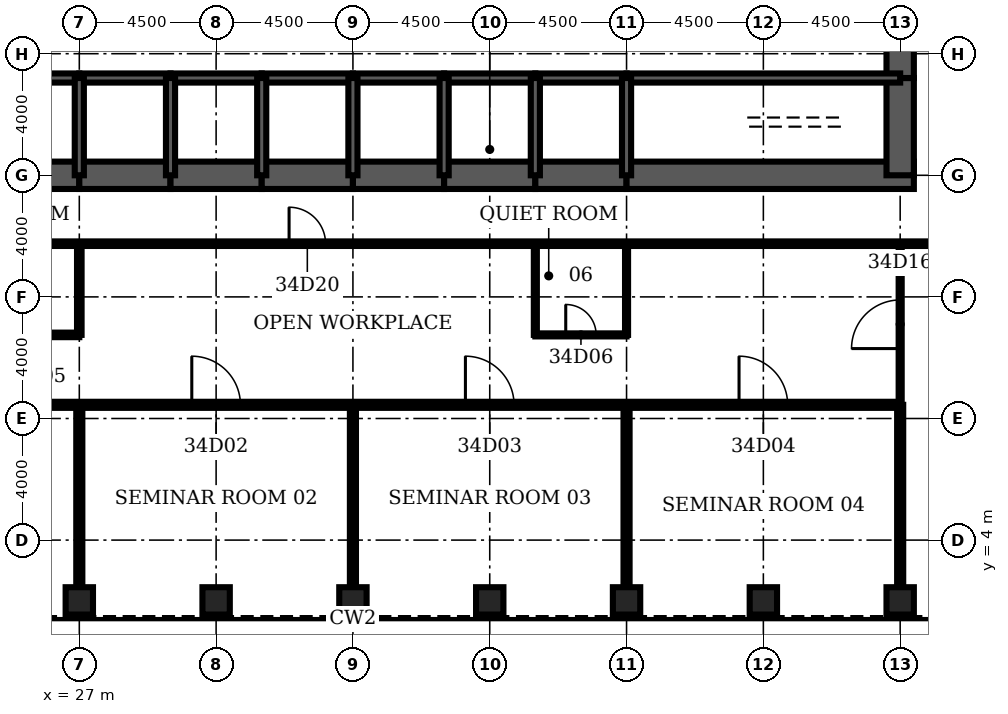
"""IFC4 building model, lengths in metres.
Left out: names, types, materials, properties, quantities, classifications, styles, units other than length and angle.
Written with IfcOpenShell. Run it as: python <this file> out.ifc"""

import sys

from ifc_helpers import new_model, si_unit, direction, frame, frame_2d, origin, origin_2d, place, context, subcontext, project, spatial, rectangle, hollow_rectangle, extrude, element, fill, save


model = new_model("IFC4")
c1 = context("Model", 3, precision=1e-05, world=origin(), true_north=direction((0.0, 1.0)))
c2 = subcontext(c1, "Body", "Model", "MODEL_VIEW")
j1 = project(units=[si_unit("LENGTHUNIT", "METRE"), si_unit("PLANEANGLEUNIT", "RADIAN")], contexts=[c1])
p1 = place(None, origin())
s1 = spatial("IfcSite", under=j1, at=p1, CompositionType="ELEMENT")
p2 = place(p1, origin())
s2 = spatial("IfcBuilding", under=s1, at=p2, CompositionType="ELEMENT")
p3 = place(p2, frame((0.0, 0.0, 155.1)))
s3 = spatial("IfcBuildingStorey", under=s2, at=p3, CompositionType="ELEMENT", Elevation=155.1)
for number, where, z_axis, x_axis in (
    (1, (27.0, 2.0, 0.0), (0.0, 0.0, 1.0), (0.0, 1.0, 0.0)),
    (2, (31.5, 2.0, 0.0), (0.0, 0.0, 1.0), (0.0, 1.0, 0.0)),
    (3, (36.0, 2.0, 0.0), (0.0, 0.0, 1.0), (0.0, 1.0, 0.0)),
    (4, (40.5, 2.0, 0.0), (0.0, 0.0, 1.0), (0.0, 1.0, 0.0)),
    (5, (45.0, 2.0, 0.0), (0.0, 0.0, 1.0), (0.0, 1.0, 0.0)),
    (6, (49.5, 2.0, 0.0), (0.0, 0.0, 1.0), (0.0, 1.0, 0.0)),
    (7, (54.0, 2.0, 0.0), (0.0, 0.0, 1.0), (0.0, 1.0, 0.0)),
):
    element("IfcColumn", number, at=place(p3, frame(where, z_axis=z_axis, x_axis=x_axis)), inside=s3, PredefinedType="COLUMN", context=c2, shape_type="SweptSolid", body=[
        extrude(hollow_rectangle(XDim=0.9, YDim=0.9, WallThickness=0.1, at=origin_2d()), origin(), (0.0, 0.0, 1.0), 4.2),
    ])
p4 = place(p3, frame((17.55, 16.0, 0.0), z_axis=(0.0, 0.0, 1.0), x_axis=(1.0, 0.0, 0.0)))
e8 = element("IfcWall", 8, at=p4, inside=s3, PredefinedType="SHEAR", context=c2, shape_type="SweptSolid", body=[
    extrude(rectangle(XDim=9.45, YDim=0.9, at=frame_2d((4.725, 0.0))), origin(), (0.0, 0.0, 1.0), 4.2),
])
for number, where, z_axis, x_axis in (
    (9, (27.0, 16.0, 0.0), (0.0, 0.0, 1.0), (1.0, 0.0, 0.0)),
    (10, (30.0, 16.0, 0.0), (0.0, 0.0, 1.0), (1.0, 0.0, 0.0)),
    (11, (33.0, 16.0, 0.0), (0.0, 0.0, 1.0), (1.0, 0.0, 0.0)),
    (12, (36.0, 16.0, 0.0), (0.0, 0.0, 1.0), (1.0, 0.0, 0.0)),
    (13, (39.0, 16.0, 0.0), (0.0, 0.0, 1.0), (1.0, 0.0, 0.0)),
    (14, (42.0, 16.0, 0.0), (0.0, 0.0, 1.0), (1.0, 0.0, 0.0)),
):
    element("IfcWall", number, at=place(p3, frame(where, z_axis=z_axis, x_axis=x_axis)), inside=s3, PredefinedType="SHEAR", context=c2, shape_type="SweptSolid", body=[
        extrude(rectangle(XDim=3.0, YDim=0.9, at=frame_2d((1.5, 0.0))), origin(), (0.0, 0.0, 1.0), 4.2),
    ])
p5 = place(p3, frame((45.0, 16.0, 0.0), z_axis=(0.0, 0.0, 1.0), x_axis=(1.0, 0.0, 0.0)))
e15 = element("IfcWall", 15, at=p5, inside=s3, PredefinedType="SHEAR", context=c2, shape_type="SweptSolid", body=[
    extrude(rectangle(XDim=9.45, YDim=0.9, at=frame_2d((4.725, 0.0))), origin(), (0.0, 0.0, 1.0), 4.2),
])
p6 = place(p3, frame((54.0, 16.0, 0.0), z_axis=(0.0, 0.0, 1.0), x_axis=(0.0, 1.0, 0.0)))
e16 = element("IfcWall", 16, at=p6, inside=s3, PredefinedType="SHEAR", context=c2, shape_type="SweptSolid", body=[
    extrude(rectangle(XDim=3.2, YDim=0.9, at=frame_2d((1.6, 0.0))), origin(), (0.0, 0.0, 1.0), 4.2),
])
p7 = place(p3, frame((54.0, 19.2, 0.0), z_axis=(0.0, 0.0, 1.0), x_axis=(0.0, 1.0, 0.0)))
e17 = element("IfcWall", 17, at=p7, inside=s3, PredefinedType="SHEAR", context=c2, shape_type="SweptSolid", body=[
    extrude(rectangle(XDim=2.8, YDim=0.9, at=frame_2d((1.4, 0.0))), origin(), (0.0, 0.0, 1.0), 4.2),
])
p8 = place(p7, frame((0.4, 0.0, 0.0)))
e18 = element("IfcOpeningElement", 18, at=p8, cuts=e17, PredefinedType="OPENING", context=c2, shape_type="SweptSolid", body=[
    extrude(rectangle(XDim=1.8, YDim=2.1, at=frame_2d((0.9, 1.05))), frame((0.0, 0.46, 0.0), z_axis=(0.0, -1.0, 0.0), x_axis=(1.0, 0.0, 0.0)), (0.0, 0.0, 1.0), 0.92),
])
p9 = place(p3, frame((18.0, 19.2, 0.0), z_axis=(0.0, 0.0, 1.0), x_axis=(1.0, 0.0, 0.0)))
e19 = element("IfcWall", 19, at=p9, inside=s3, PredefinedType="SOLIDWALL", context=c2, shape_type="SweptSolid", body=[
    extrude(rectangle(XDim=9.0, YDim=0.3, at=frame_2d((4.5, 0.0))), origin(), (0.0, 0.0, 1.0), 4.2),
])
p10 = place(p9, frame((0.65, 0.0, 0.0)))
e20 = element("IfcOpeningElement", 20, at=p10, cuts=e19, PredefinedType="OPENING", context=c2, shape_type="SweptSolid", body=[
    extrude(rectangle(XDim=1.0, YDim=2.1, at=frame_2d((0.5, 1.05))), frame((0.0, 0.16, 0.0), z_axis=(0.0, -1.0, 0.0), x_axis=(1.0, 0.0, 0.0)), (0.0, 0.0, 1.0), 0.32),
])
p11 = place(p3, frame((27.0, 19.2, 0.0), z_axis=(0.0, 0.0, 1.0), x_axis=(1.0, 0.0, 0.0)))
e21 = element("IfcWall", 21, at=p11, inside=s3, PredefinedType="SOLIDWALL", context=c2, shape_type="SweptSolid", body=[
    extrude(rectangle(XDim=3.0, YDim=0.3, at=frame_2d((1.5, 0.0))), origin(), (0.0, 0.0, 1.0), 4.2),
])
p12 = place(p11, frame((0.95, 0.0, 0.0)))
e22 = element("IfcOpeningElement", 22, at=p12, cuts=e21, PredefinedType="OPENING", context=c2, shape_type="SweptSolid", body=[
    extrude(rectangle(XDim=1.1, YDim=2.2, at=frame_2d((0.55, 1.1))), frame((0.0, 0.16, 0.0), z_axis=(0.0, -1.0, 0.0), x_axis=(1.0, 0.0, 0.0)), (0.0, 0.0, 1.0), 0.32),
])
p13 = place(p3, frame((30.0, 19.2, 0.0), z_axis=(0.0, 0.0, 1.0), x_axis=(1.0, 0.0, 0.0)))
e23 = element("IfcWall", 23, at=p13, inside=s3, PredefinedType="SOLIDWALL", context=c2, shape_type="SweptSolid", body=[
    extrude(rectangle(XDim=3.0, YDim=0.3, at=frame_2d((1.5, 0.0))), origin(), (0.0, 0.0, 1.0), 4.2),
])
p14 = place(p13, frame((0.95, 0.0, 0.0)))
e24 = element("IfcOpeningElement", 24, at=p14, cuts=e23, PredefinedType="OPENING", context=c2, shape_type="SweptSolid", body=[
    extrude(rectangle(XDim=1.1, YDim=2.2, at=frame_2d((0.55, 1.1))), frame((0.0, 0.16, 0.0), z_axis=(0.0, -1.0, 0.0), x_axis=(1.0, 0.0, 0.0)), (0.0, 0.0, 1.0), 0.32),
])
p15 = place(p3, frame((33.0, 19.2, 0.0), z_axis=(0.0, 0.0, 1.0), x_axis=(1.0, 0.0, 0.0)))
e25 = element("IfcWall", 25, at=p15, inside=s3, PredefinedType="SOLIDWALL", context=c2, shape_type="SweptSolid", body=[
    extrude(rectangle(XDim=3.0, YDim=0.3, at=frame_2d((1.5, 0.0))), origin(), (0.0, 0.0, 1.0), 4.2),
])
p16 = place(p15, frame((0.95, 0.0, 0.0)))
e26 = element("IfcOpeningElement", 26, at=p16, cuts=e25, PredefinedType="OPENING", context=c2, shape_type="SweptSolid", body=[
    extrude(rectangle(XDim=1.1, YDim=2.2, at=frame_2d((0.55, 1.1))), frame((0.0, 0.16, 0.0), z_axis=(0.0, -1.0, 0.0), x_axis=(1.0, 0.0, 0.0)), (0.0, 0.0, 1.0), 0.32),
])
p17 = place(p3, frame((36.0, 19.2, 0.0), z_axis=(0.0, 0.0, 1.0), x_axis=(1.0, 0.0, 0.0)))
e27 = element("IfcWall", 27, at=p17, inside=s3, PredefinedType="SOLIDWALL", context=c2, shape_type="SweptSolid", body=[
    extrude(rectangle(XDim=3.0, YDim=0.3, at=frame_2d((1.5, 0.0))), origin(), (0.0, 0.0, 1.0), 4.2),
])
p18 = place(p17, frame((0.95, 0.0, 0.0)))
e28 = element("IfcOpeningElement", 28, at=p18, cuts=e27, PredefinedType="OPENING", context=c2, shape_type="SweptSolid", body=[
    extrude(rectangle(XDim=1.1, YDim=2.2, at=frame_2d((0.55, 1.1))), frame((0.0, 0.16, 0.0), z_axis=(0.0, -1.0, 0.0), x_axis=(1.0, 0.0, 0.0)), (0.0, 0.0, 1.0), 0.32),
])
p19 = place(p3, frame((39.0, 19.2, 0.0), z_axis=(0.0, 0.0, 1.0), x_axis=(1.0, 0.0, 0.0)))
e29 = element("IfcWall", 29, at=p19, inside=s3, PredefinedType="SOLIDWALL", context=c2, shape_type="SweptSolid", body=[
    extrude(rectangle(XDim=3.0, YDim=0.3, at=frame_2d((1.5, 0.0))), origin(), (0.0, 0.0, 1.0), 4.2),
])
p20 = place(p19, frame((1.0, 0.0, 0.0)))
e30 = element("IfcOpeningElement", 30, at=p20, cuts=e29, PredefinedType="OPENING", context=c2, shape_type="SweptSolid", body=[
    extrude(rectangle(XDim=1.0, YDim=2.1, at=frame_2d((0.5, 1.05))), frame((0.0, 0.16, 0.0), z_axis=(0.0, -1.0, 0.0), x_axis=(1.0, 0.0, 0.0)), (0.0, 0.0, 1.0), 0.32),
])
p21 = place(p3, frame((42.0, 19.2, 0.0), z_axis=(0.0, 0.0, 1.0), x_axis=(1.0, 0.0, 0.0)))
e31 = element("IfcWall", 31, at=p21, inside=s3, PredefinedType="SOLIDWALL", context=c2, shape_type="SweptSolid", body=[
    extrude(rectangle(XDim=3.0, YDim=0.3, at=frame_2d((1.5, 0.0))), origin(), (0.0, 0.0, 1.0), 4.2),
])
p22 = place(p3, frame((45.0, 19.2, 0.0), z_axis=(0.0, 0.0, 1.0), x_axis=(1.0, 0.0, 0.0)))
e32 = element("IfcWall", 32, at=p22, inside=s3, PredefinedType="SOLIDWALL", context=c2, shape_type="SweptSolid", body=[
    extrude(rectangle(XDim=9.0, YDim=0.3, at=frame_2d((4.5, 0.0))), origin(), (0.0, 0.0, 1.0), 4.2),
])
p23 = place(p22, frame((7.35, 0.0, 0.0)))
e33 = element("IfcOpeningElement", 33, at=p23, cuts=e32, PredefinedType="OPENING", context=c2, shape_type="SweptSolid", body=[
    extrude(rectangle(XDim=1.0, YDim=2.1, at=frame_2d((0.5, 1.05))), frame((0.0, 0.16, 0.0), z_axis=(0.0, -1.0, 0.0), x_axis=(1.0, 0.0, 0.0)), (0.0, 0.0, 1.0), 0.32),
])
for number, where, z_axis, x_axis in (
    (34, (27.0, 16.0, 0.0), (0.0, 0.0, 1.0), (0.0, 1.0, 0.0)),
    (35, (30.0, 16.0, 0.0), (0.0, 0.0, 1.0), (0.0, 1.0, 0.0)),
    (36, (33.0, 16.0, 0.0), (0.0, 0.0, 1.0), (0.0, 1.0, 0.0)),
    (37, (36.0, 16.0, 0.0), (0.0, 0.0, 1.0), (0.0, 1.0, 0.0)),
    (38, (39.0, 16.0, 0.0), (0.0, 0.0, 1.0), (0.0, 1.0, 0.0)),
    (39, (42.0, 16.0, 0.0), (0.0, 0.0, 1.0), (0.0, 1.0, 0.0)),
    (40, (45.0, 16.0, 0.0), (0.0, 0.0, 1.0), (0.0, 1.0, 0.0)),
):
    element("IfcWall", number, at=place(p3, frame(where, z_axis=z_axis, x_axis=x_axis)), inside=s3, PredefinedType="SOLIDWALL", context=c2, shape_type="SweptSolid", body=[
        extrude(rectangle(XDim=3.2, YDim=0.3, at=frame_2d((1.6, 0.0))), origin(), (0.0, 0.0, 1.0), 4.2),
    ])
p24 = place(p3, frame((39.15, 17.4, 0.0), z_axis=(0.0, 0.0, 1.0), x_axis=(1.0, 0.0, 0.0)))
e41 = element("IfcWall", 41, at=p24, inside=s3, PredefinedType="SOLIDWALL", context=c2, shape_type="SweptSolid", body=[
    extrude(rectangle(XDim=2.7, YDim=0.3, at=frame_2d((1.35, 0.0))), origin(), (0.0, 0.0, 1.0), 4.04),
])
p25 = place(p24, frame((0.85, 0.0, 0.0)))
e42 = element("IfcOpeningElement", 42, at=p25, cuts=e41, PredefinedType="OPENING", context=c2, shape_type="SweptSolid", body=[
    extrude(rectangle(XDim=1.0, YDim=2.1, at=frame_2d((0.5, 1.05))), frame((0.0, 0.16, 0.0), z_axis=(0.0, -1.0, 0.0), x_axis=(1.0, 0.0, 0.0)), (0.0, 0.0, 1.0), 0.32),
])
p26 = place(p3, frame((18.0, 8.45, 0.0), z_axis=(0.0, 0.0, 1.0), x_axis=(1.0, 0.0, 0.0)))
e43 = element("IfcWall", 43, at=p26, inside=s3, PredefinedType="PARTITIONING", context=c2, shape_type="SweptSolid", body=[
    extrude(rectangle(XDim=36.0, YDim=0.2, at=frame_2d((18.0, 0.0))), origin(), (0.0, 0.0, 1.0), 3.0),
])
p27 = place(p26, frame((3.7, 0.0, 0.0)))
e44 = element("IfcOpeningElement", 44, at=p27, cuts=e43, PredefinedType="OPENING", context=c2, shape_type="SweptSolid", body=[
    extrude(rectangle(XDim=1.6, YDim=2.1, at=frame_2d((0.8, 1.05))), frame((0.0, 0.11, 0.0), z_axis=(0.0, -1.0, 0.0), x_axis=(1.0, 0.0, 0.0)), (0.0, 0.0, 1.0), 0.22),
])
p28 = place(p26, frame((12.7, 0.0, 0.0)))
e45 = element("IfcOpeningElement", 45, at=p28, cuts=e43, PredefinedType="OPENING", context=c2, shape_type="SweptSolid", body=[
    extrude(rectangle(XDim=1.6, YDim=2.1, at=frame_2d((0.8, 1.05))), frame((0.0, 0.11, 0.0), z_axis=(0.0, -1.0, 0.0), x_axis=(1.0, 0.0, 0.0)), (0.0, 0.0, 1.0), 0.22),
])
p29 = place(p26, frame((21.7, 0.0, 0.0)))
e46 = element("IfcOpeningElement", 46, at=p29, cuts=e43, PredefinedType="OPENING", context=c2, shape_type="SweptSolid", body=[
    extrude(rectangle(XDim=1.6, YDim=2.1, at=frame_2d((0.8, 1.05))), frame((0.0, 0.11, 0.0), z_axis=(0.0, -1.0, 0.0), x_axis=(1.0, 0.0, 0.0)), (0.0, 0.0, 1.0), 0.22),
])
p30 = place(p26, frame((30.7, 0.0, 0.0)))
e47 = element("IfcOpeningElement", 47, at=p30, cuts=e43, PredefinedType="OPENING", context=c2, shape_type="SweptSolid", body=[
    extrude(rectangle(XDim=1.6, YDim=2.1, at=frame_2d((0.8, 1.05))), frame((0.0, 0.11, 0.0), z_axis=(0.0, -1.0, 0.0), x_axis=(1.0, 0.0, 0.0)), (0.0, 0.0, 1.0), 0.22),
])
p31 = place(p3, frame((24.0, 10.75, 0.0), z_axis=(0.0, 0.0, 1.0), x_axis=(1.0, 0.0, 0.0)))
e48 = element("IfcWall", 48, at=p31, inside=s3, PredefinedType="PARTITIONING", context=c2, shape_type="SweptSolid", body=[
    extrude(rectangle(XDim=3.0, YDim=0.15, at=frame_2d((1.5, 0.0))), origin(), (0.0, 0.0, 1.0), 3.0),
])
p32 = place(p31, frame((1.0, 0.0, 0.0)))
e49 = element("IfcOpeningElement", 49, at=p32, cuts=e48, PredefinedType="OPENING", context=c2, shape_type="SweptSolid", body=[
    extrude(rectangle(XDim=1.0, YDim=2.1, at=frame_2d((0.5, 1.05))), frame((0.0, 0.085, 0.0), z_axis=(0.0, -1.0, 0.0), x_axis=(1.0, 0.0, 0.0)), (0.0, 0.0, 1.0), 0.17),
])
p33 = place(p3, frame((42.0, 10.75, 0.0), z_axis=(0.0, 0.0, 1.0), x_axis=(1.0, 0.0, 0.0)))
e50 = element("IfcWall", 50, at=p33, inside=s3, PredefinedType="PARTITIONING", context=c2, shape_type="SweptSolid", body=[
    extrude(rectangle(XDim=3.0, YDim=0.1, at=frame_2d((1.5, 0.0))), origin(), (0.0, 0.0, 1.0), 3.0),
])
p34 = place(p33, frame((1.0, 0.0, 0.0)))
e51 = element("IfcOpeningElement", 51, at=p34, cuts=e50, PredefinedType="OPENING", context=c2, shape_type="SweptSolid", body=[
    extrude(rectangle(XDim=1.0, YDim=2.1, at=frame_2d((0.5, 1.05))), frame((0.0, 0.06, 0.0), z_axis=(0.0, -1.0, 0.0), x_axis=(1.0, 0.0, 0.0)), (0.0, 0.0, 1.0), 0.12),
])
p35 = place(p3, frame((15.15, 13.75, 0.0), z_axis=(0.0, 0.0, 1.0), x_axis=(1.0, 0.0, 0.0)))
e52 = element("IfcWall", 52, at=p35, inside=s3, PredefinedType="PARTITIONING", context=c2, shape_type="SweptSolid", body=[
    extrude(rectangle(XDim=41.7, YDim=0.15, at=frame_2d((20.85, 0.0))), origin(), (0.0, 0.0, 1.0), 3.0),
])
p36 = place(p35, frame((18.75, 0.0, 0.0)))
e53 = element("IfcOpeningElement", 53, at=p36, cuts=e52, PredefinedType="OPENING", context=c2, shape_type="SweptSolid", body=[
    extrude(rectangle(XDim=1.2, YDim=2.1, at=frame_2d((0.6, 1.05))), frame((0.0, 0.085, 0.0), z_axis=(0.0, -1.0, 0.0), x_axis=(1.0, 0.0, 0.0)), (0.0, 0.0, 1.0), 0.17),
])
p37 = place(p3, frame((27.0, 2.45, 0.0), z_axis=(0.0, 0.0, 1.0), x_axis=(0.0, 1.0, 0.0)))
e54 = element("IfcWall", 54, at=p37, inside=s3, PredefinedType="PARTITIONING", context=c2, shape_type="SweptSolid", body=[
    extrude(rectangle(XDim=6.0, YDim=0.2, at=frame_2d((3.0, 0.0))), origin(), (0.0, 0.0, 1.0), 3.0),
])
p38 = place(p3, frame((27.0, 10.75, 0.0), z_axis=(0.0, 0.0, 1.0), x_axis=(0.0, 1.0, 0.0)))
e55 = element("IfcWall", 55, at=p38, inside=s3, PredefinedType="PARTITIONING", context=c2, shape_type="SweptSolid", body=[
    extrude(rectangle(XDim=3.0, YDim=0.15, at=frame_2d((1.5, 0.0))), origin(), (0.0, 0.0, 1.0), 3.0),
])
p39 = place(p3, frame((36.0, 2.45, 0.0), z_axis=(0.0, 0.0, 1.0), x_axis=(0.0, 1.0, 0.0)))
e56 = element("IfcWall", 56, at=p39, inside=s3, PredefinedType="PARTITIONING", context=c2, shape_type="SweptSolid", body=[
    extrude(rectangle(XDim=6.0, YDim=0.2, at=frame_2d((3.0, 0.0))), origin(), (0.0, 0.0, 1.0), 3.0),
])
p40 = place(p3, frame((42.0, 10.75, 0.0), z_axis=(0.0, 0.0, 1.0), x_axis=(0.0, 1.0, 0.0)))
e57 = element("IfcWall", 57, at=p40, inside=s3, PredefinedType="PARTITIONING", context=c2, shape_type="SweptSolid", body=[
    extrude(rectangle(XDim=3.0, YDim=0.1, at=frame_2d((1.5, 0.0))), origin(), (0.0, 0.0, 1.0), 3.0),
])
p41 = place(p3, frame((45.0, 2.45, 0.0), z_axis=(0.0, 0.0, 1.0), x_axis=(0.0, 1.0, 0.0)))
e58 = element("IfcWall", 58, at=p41, inside=s3, PredefinedType="PARTITIONING", context=c2, shape_type="SweptSolid", body=[
    extrude(rectangle(XDim=6.0, YDim=0.2, at=frame_2d((3.0, 0.0))), origin(), (0.0, 0.0, 1.0), 3.0),
])
p42 = place(p3, frame((45.0, 10.75, 0.0), z_axis=(0.0, 0.0, 1.0), x_axis=(0.0, 1.0, 0.0)))
e59 = element("IfcWall", 59, at=p42, inside=s3, PredefinedType="PARTITIONING", context=c2, shape_type="SweptSolid", body=[
    extrude(rectangle(XDim=3.0, YDim=0.1, at=frame_2d((1.5, 0.0))), origin(), (0.0, 0.0, 1.0), 3.0),
])
p43 = place(p3, frame((54.0, 2.45, 0.0), z_axis=(0.0, 0.0, 1.0), x_axis=(0.0, 1.0, 0.0)))
e60 = element("IfcWall", 60, at=p43, inside=s3, PredefinedType="PARTITIONING", context=c2, shape_type="SweptSolid", body=[
    extrude(rectangle(XDim=6.0, YDim=0.2, at=frame_2d((3.0, 0.0))), origin(), (0.0, 0.0, 1.0), 3.0),
])
p44 = place(p3, frame((54.0, 8.45, 0.0), z_axis=(0.0, 0.0, 1.0), x_axis=(0.0, 1.0, 0.0)))
e61 = element("IfcWall", 61, at=p44, inside=s3, PredefinedType="PARTITIONING", context=c2, shape_type="SweptSolid", body=[
    extrude(rectangle(XDim=5.3, YDim=0.1, at=frame_2d((2.65, 0.0))), origin(), (0.0, 0.0, 1.0), 3.0),
])
p45 = place(p44, frame((1.85, 0.0, 0.0)))
e62 = element("IfcOpeningElement", 62, at=p45, cuts=e61, PredefinedType="OPENING", context=c2, shape_type="SweptSolid", body=[
    extrude(rectangle(XDim=1.6, YDim=2.1, at=frame_2d((0.8, 1.05))), frame((0.0, 0.06, 0.0), z_axis=(0.0, -1.0, 0.0), x_axis=(1.0, 0.0, 0.0)), (0.0, 0.0, 1.0), 0.12),
])
p46 = place(p25, origin())
e63 = element("IfcDoor", 63, at=p46, inside=s3, OperationType="SINGLE_SWING_LEFT", PredefinedType="DOOR", context=c2, shape_type="SweptSolid", body=[
    extrude(rectangle(XDim=1.0, YDim=2.1, at=frame_2d((0.5, 1.05))), frame((0.0, 0.025, 0.0), z_axis=(0.0, -1.0, 0.0), x_axis=(1.0, 0.0, 0.0)), (0.0, 0.0, 1.0), 0.05),
])
fill(e42, e63)
p47 = place(p28, origin())
e64 = element("IfcDoor", 64, at=p47, inside=s3, OperationType="SINGLE_SWING_LEFT", PredefinedType="DOOR", context=c2, shape_type="SweptSolid", body=[
    extrude(rectangle(XDim=1.6, YDim=2.1, at=frame_2d((0.8, 1.05))), frame((0.0, 0.025, 0.0), z_axis=(0.0, -1.0, 0.0), x_axis=(1.0, 0.0, 0.0)), (0.0, 0.0, 1.0), 0.05),
])
fill(e45, e64)
p48 = place(p29, origin())
e65 = element("IfcDoor", 65, at=p48, inside=s3, OperationType="SINGLE_SWING_LEFT", PredefinedType="DOOR", context=c2, shape_type="SweptSolid", body=[
    extrude(rectangle(XDim=1.6, YDim=2.1, at=frame_2d((0.8, 1.05))), frame((0.0, 0.025, 0.0), z_axis=(0.0, -1.0, 0.0), x_axis=(1.0, 0.0, 0.0)), (0.0, 0.0, 1.0), 0.05),
])
fill(e46, e65)
p49 = place(p30, origin())
e66 = element("IfcDoor", 66, at=p49, inside=s3, OperationType="SINGLE_SWING_LEFT", PredefinedType="DOOR", context=c2, shape_type="SweptSolid", body=[
    extrude(rectangle(XDim=1.6, YDim=2.1, at=frame_2d((0.8, 1.05))), frame((0.0, 0.025, 0.0), z_axis=(0.0, -1.0, 0.0), x_axis=(1.0, 0.0, 0.0)), (0.0, 0.0, 1.0), 0.05),
])
fill(e47, e66)
p50 = place(p34, origin())
e67 = element("IfcDoor", 67, at=p50, inside=s3, OperationType="SINGLE_SWING_LEFT", PredefinedType="DOOR", context=c2, shape_type="SweptSolid", body=[
    extrude(rectangle(XDim=1.0, YDim=2.1, at=frame_2d((0.5, 1.05))), frame((0.0, 0.025, 0.0), z_axis=(0.0, -1.0, 0.0), x_axis=(1.0, 0.0, 0.0)), (0.0, 0.0, 1.0), 0.05),
])
fill(e51, e67)
p51 = place(p45, origin())
e68 = element("IfcDoor", 68, at=p51, inside=s3, OperationType="SINGLE_SWING_LEFT", PredefinedType="DOOR", context=c2, shape_type="SweptSolid", body=[
    extrude(rectangle(XDim=1.6, YDim=2.1, at=frame_2d((0.8, 1.05))), frame((0.0, 0.025, 0.0), z_axis=(0.0, -1.0, 0.0), x_axis=(1.0, 0.0, 0.0)), (0.0, 0.0, 1.0), 0.05),
])
fill(e62, e68)
p52 = place(p36, origin())
e69 = element("IfcDoor", 69, at=p52, inside=s3, OperationType="SINGLE_SWING_LEFT", PredefinedType="DOOR", context=c2, shape_type="SweptSolid", body=[
    extrude(rectangle(XDim=1.2, YDim=2.1, at=frame_2d((0.6, 1.05))), frame((0.0, 0.025, 0.0), z_axis=(0.0, -1.0, 0.0), x_axis=(1.0, 0.0, 0.0)), (0.0, 0.0, 1.0), 0.05),
])
fill(e53, e69)
p53 = place(p12, origin())
e70 = element("IfcDoor", 70, at=p53, inside=s3, OperationType="DOUBLE_DOOR_SLIDING", PredefinedType="USERDEFINED", context=c2, shape_type="SweptSolid", body=[
    extrude(rectangle(XDim=1.1, YDim=2.2, at=frame_2d((0.55, 1.1))), frame((0.0, 0.025, 0.0), z_axis=(0.0, -1.0, 0.0), x_axis=(1.0, 0.0, 0.0)), (0.0, 0.0, 1.0), 0.05),
])
fill(e22, e70)
p54 = place(p14, origin())
e71 = element("IfcDoor", 71, at=p54, inside=s3, OperationType="DOUBLE_DOOR_SLIDING", PredefinedType="USERDEFINED", context=c2, shape_type="SweptSolid", body=[
    extrude(rectangle(XDim=1.1, YDim=2.2, at=frame_2d((0.55, 1.1))), frame((0.0, 0.025, 0.0), z_axis=(0.0, -1.0, 0.0), x_axis=(1.0, 0.0, 0.0)), (0.0, 0.0, 1.0), 0.05),
])
fill(e24, e71)
p55 = place(p16, origin())
e72 = element("IfcDoor", 72, at=p55, inside=s3, OperationType="DOUBLE_DOOR_SLIDING", PredefinedType="USERDEFINED", context=c2, shape_type="SweptSolid", body=[
    extrude(rectangle(XDim=1.1, YDim=2.2, at=frame_2d((0.55, 1.1))), frame((0.0, 0.025, 0.0), z_axis=(0.0, -1.0, 0.0), x_axis=(1.0, 0.0, 0.0)), (0.0, 0.0, 1.0), 0.05),
])
fill(e26, e72)
p56 = place(p18, origin())
e73 = element("IfcDoor", 73, at=p56, inside=s3, OperationType="DOUBLE_DOOR_SLIDING", PredefinedType="USERDEFINED", context=c2, shape_type="SweptSolid", body=[
    extrude(rectangle(XDim=1.1, YDim=2.2, at=frame_2d((0.55, 1.1))), frame((0.0, 0.025, 0.0), z_axis=(0.0, -1.0, 0.0), x_axis=(1.0, 0.0, 0.0)), (0.0, 0.0, 1.0), 0.05),
])
fill(e28, e73)
p57 = place(p23, origin())
e74 = element("IfcDoor", 74, at=p57, inside=s3, OperationType="SINGLE_SWING_RIGHT", PredefinedType="DOOR", context=c2, shape_type="SweptSolid", body=[
    extrude(rectangle(XDim=1.0, YDim=2.1, at=frame_2d((0.5, 1.05))), frame((0.0, 0.025, 0.0), z_axis=(0.0, -1.0, 0.0), x_axis=(1.0, 0.0, 0.0)), (0.0, 0.0, 1.0), 0.05),
])
fill(e33, e74)
p58 = place(p8, origin())
e75 = element("IfcDoor", 75, at=p58, inside=s3, OperationType="SINGLE_SWING_LEFT", PredefinedType="DOOR", context=c2, shape_type="SweptSolid", body=[
    extrude(rectangle(XDim=1.8, YDim=2.1, at=frame_2d((0.9, 1.05))), frame((0.0, 0.45, 0.0), z_axis=(0.0, -1.0, 0.0), x_axis=(1.0, 0.0, 0.0)), (0.0, 0.0, 1.0), 0.899),
])
fill(e18, e75)
p59 = place(p20, origin())
e76 = element("IfcDoor", 76, at=p59, inside=s3, OperationType="SINGLE_SWING_LEFT", PredefinedType="DOOR", context=c2, shape_type="SweptSolid", body=[
    extrude(rectangle(XDim=1.0, YDim=2.1, at=frame_2d((0.5, 1.05))), frame((0.0, 0.025, 0.0), z_axis=(0.0, -1.0, 0.0), x_axis=(1.0, 0.0, 0.0)), (0.0, 0.0, 1.0), 0.05),
])
fill(e30, e76)
save(model, sys.argv[1])
